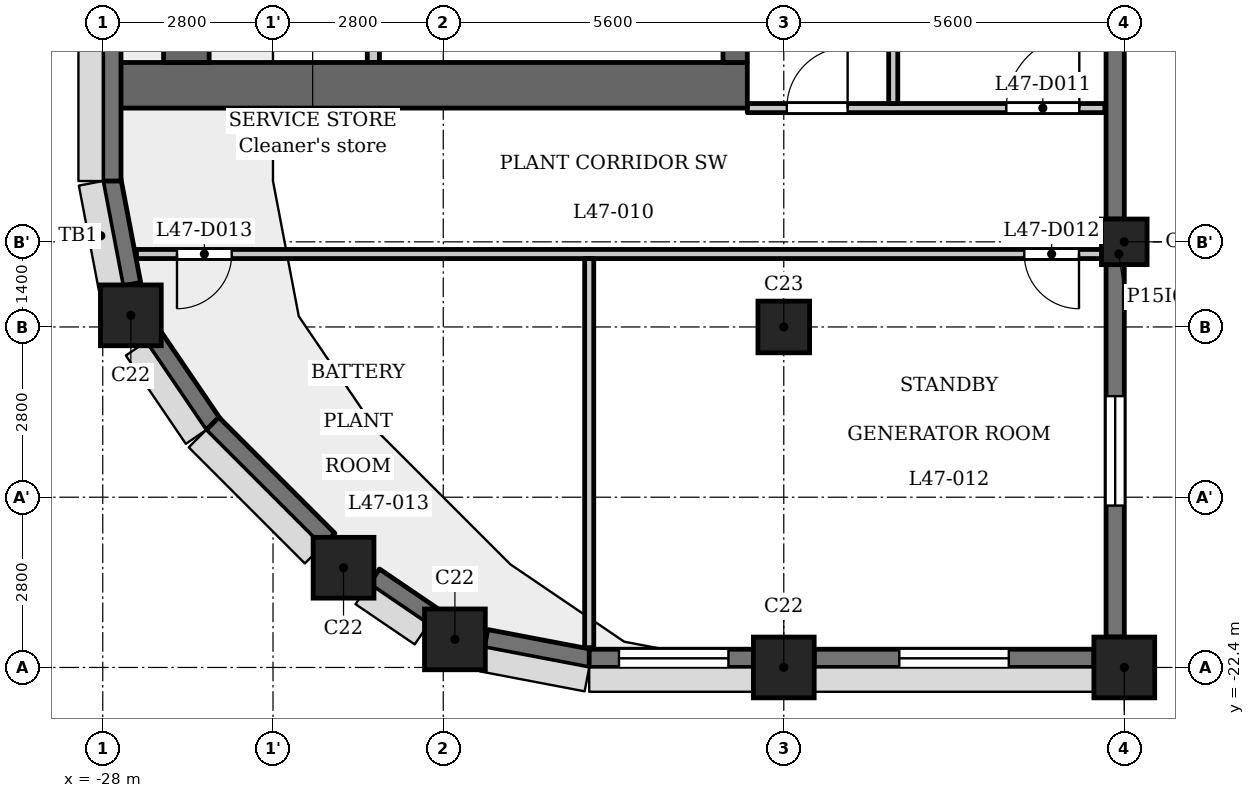
"""IFC4 building model, lengths in metres.
Left out: names, types, materials, properties, quantities, classifications, styles, units other than length and angle.
Written with IfcOpenShell. Run it as: python <this file> out.ifc"""

import sys

from ifc_helpers import new_model, si_unit, direction, frame, frame_2d, origin, origin_2d, place, context, subcontext, project, spatial, rectangle, extrude, element, fill, save


model = new_model("IFC4")
c1 = context("Model", 3, precision=1e-05, world=origin(), true_north=direction((0.0, 1.0)))
c2 = subcontext(c1, "Body", "Model", "MODEL_VIEW")
j1 = project(units=[si_unit("LENGTHUNIT", "METRE"), si_unit("PLANEANGLEUNIT", "RADIAN")], contexts=[c1])
p1 = place(None, origin())
s1 = spatial("IfcSite", under=j1, at=p1, CompositionType="ELEMENT")
p2 = place(p1, origin())
s2 = spatial("IfcBuilding", under=s1, at=p2, CompositionType="ELEMENT")
p3 = place(p2, frame((0.0, 0.0, 183.5)))
s3 = spatial("IfcBuildingStorey", under=s2, at=p3, CompositionType="ELEMENT", Elevation=183.5)
for number, where, z_axis, x_axis in (
    (1, (-22.209, -21.938, 0.0), (0.0, 0.0, 1.0), (1.0, 0.0, 0.0)),
    (2, (-16.8, -22.4, 0.0), (0.0, 0.0, 1.0), (1.0, 0.0, 0.0)),
    (3, (-11.2, -22.4, 0.0), (0.0, 0.0, 1.0), (1.0, 0.0, 0.0)),
    (4, (-27.538, -16.609, 0.0), (0.0, 0.0, 1.0), (1.0, 0.0, 0.0)),
    (5, (-24.04, -20.76, 0.0), (0.0, 0.0, 1.0), (1.0, 0.0, 0.0)),
):
    element("IfcColumn", number, at=place(p3, frame(where, z_axis=z_axis, x_axis=x_axis)), inside=s3, PredefinedType="COLUMN", context=c2, shape_type="SweptSolid", body=[
        extrude(rectangle(XDim=1.0, YDim=1.0, at=origin_2d()), origin(), (0.0, 0.0, 1.0), 5.4),
    ])
p4 = place(p3, frame((-16.8, -16.8, 0.0), z_axis=(0.0, 0.0, 1.0), x_axis=(1.0, 0.0, 0.0)))
e6 = element("IfcColumn", 6, at=p4, inside=s3, PredefinedType="COLUMN", context=c2, shape_type="SweptSolid", body=[
    extrude(rectangle(XDim=0.85, YDim=0.85, at=origin_2d()), origin(), (0.0, 0.0, 1.0), 5.4),
])
p5 = place(p3, frame((-11.2, -15.4, 0.0), z_axis=(0.0, 0.0, 1.0), x_axis=(1.0, 0.0, 0.0)))
e7 = element("IfcColumn", 7, at=p5, inside=s3, PredefinedType="COLUMN", context=c2, shape_type="SweptSolid", body=[
    extrude(rectangle(XDim=0.75, YDim=0.75, at=origin_2d()), origin(), (0.0, 0.0, 1.0), 5.4),
])
for number, where, z_axis, x_axis in (
    (8, (-27.853, -14.372, 0.0), (0.0, 0.0, 1.0), (0.187, -0.982, 0.0)),
    (9, (-27.166, -16.96, 0.0), (0.0, 0.0, 1.0), (0.562, -0.827, 0.0)),
):
    element("IfcWall", number, at=place(p3, frame(where, z_axis=z_axis, x_axis=x_axis)), inside=s3, PredefinedType="SOLIDWALL", context=c2, shape_type="SweptSolid", body=[
        extrude(rectangle(XDim=1.756, YDim=0.3, at=frame_2d((0.878, 0.0))), origin(), (0.0, 0.0, 1.0), 2.6),
    ])
p6 = place(p3, frame((-26.197, -18.391, 0.0), z_axis=(0.0, 0.0, 1.0), x_axis=(0.707061571201, -0.707151988282, 0.0)))
e10 = element("IfcWall", 10, at=p6, inside=s3, PredefinedType="SOLIDWALL", context=c2, shape_type="SweptSolid", body=[
    extrude(rectangle(XDim=2.7, YDim=0.3, at=frame_2d((1.35, 0.0))), origin(), (0.0, 0.0, 1.0), 2.6),
])
p7 = place(p3, frame((-23.534, -20.904, 0.0), z_axis=(0.0, 0.0, 1.0), x_axis=(0.827103906596, -0.56204904385, 0.0)))
e11 = element("IfcWall", 11, at=p7, inside=s3, PredefinedType="SOLIDWALL", context=c2, shape_type="SweptSolid", body=[
    extrude(rectangle(XDim=1.177, YDim=0.3, at=frame_2d((0.589, 0.0))), origin(), (0.0, 0.0, 1.0), 4.6),
])
p8 = place(p3, frame((-21.697, -21.924, 0.0), z_axis=(0.0, 0.0, 1.0), x_axis=(0.982284988433, -0.187393173565, 0.0)))
e12 = element("IfcWall", 12, at=p8, inside=s3, PredefinedType="SOLIDWALL", context=c2, shape_type="SweptSolid", body=[
    extrude(rectangle(XDim=1.756, YDim=0.3, at=frame_2d((0.878, 0.0))), origin(), (0.0, 0.0, 1.0), 2.6),
])
p9 = place(p3, frame((-20.0, -22.25, 0.0), z_axis=(0.0, 0.0, 1.0), x_axis=(1.0, 0.0, 0.0)))
e13 = element("IfcWall", 13, at=p9, inside=s3, PredefinedType="SOLIDWALL", context=c2, shape_type="SweptSolid", body=[
    extrude(rectangle(XDim=2.7, YDim=0.3, at=frame_2d((1.35, 0.0))), origin(), (0.0, 0.0, 1.0), 2.6),
])
p10 = place(p9, frame((0.49, 0.0, 0.9)))
e14 = element("IfcOpeningElement", 14, at=p10, cuts=e13, PredefinedType="OPENING", context=c2, shape_type="SweptSolid", body=[
    extrude(rectangle(XDim=1.8, YDim=1.5, at=frame_2d((0.9, 0.75))), frame((0.0, 0.16, 0.0), z_axis=(0.0, -1.0, 0.0), x_axis=(1.0, 0.0, 0.0)), (0.0, 0.0, 1.0), 0.32),
])
p11 = place(p3, frame((-16.3, -22.25, 0.0), z_axis=(0.0, 0.0, 1.0), x_axis=(1.0, 0.0, 0.0)))
e15 = element("IfcWall", 15, at=p11, inside=s3, PredefinedType="SOLIDWALL", context=c2, shape_type="SweptSolid", body=[
    extrude(rectangle(XDim=4.6, YDim=0.3, at=frame_2d((2.3, 0.0))), origin(), (0.0, 0.0, 1.0), 2.6),
])
p12 = place(p11, frame((1.4, 0.0, 0.9)))
e16 = element("IfcOpeningElement", 16, at=p12, cuts=e15, PredefinedType="OPENING", context=c2, shape_type="SweptSolid", body=[
    extrude(rectangle(XDim=1.8, YDim=1.5, at=frame_2d((0.9, 0.75))), frame((0.0, 0.16, 0.0), z_axis=(0.0, -1.0, 0.0), x_axis=(1.0, 0.0, 0.0)), (0.0, 0.0, 1.0), 0.32),
])
p13 = place(p3, frame((-11.35, -21.9, 0.0), z_axis=(0.0, 0.0, 1.0), x_axis=(0.0, 1.0, 0.0)))
e17 = element("IfcWall", 17, at=p13, inside=s3, PredefinedType="SOLIDWALL", context=c2, shape_type="SweptSolid", body=[
    extrude(rectangle(XDim=6.125, YDim=0.3, at=frame_2d((3.062, 0.0))), origin(), (0.0, 0.0, 1.0), 4.6),
])
p14 = place(p13, frame((2.163, 0.0, 0.9)))
e18 = element("IfcOpeningElement", 18, at=p14, cuts=e17, PredefinedType="OPENING", context=c2, shape_type="SweptSolid", body=[
    extrude(rectangle(XDim=1.8, YDim=1.5, at=frame_2d((0.9, 0.75))), frame((0.0, 0.16, 0.0), z_axis=(0.0, -1.0, 0.0), x_axis=(1.0, 0.0, 0.0)), (0.0, 0.0, 1.0), 0.32),
])
p15 = place(p3, frame((-11.35, -15.025, 0.0), z_axis=(0.0, 0.0, 1.0), x_axis=(0.0, 1.0, 0.0)))
e19 = element("IfcWall", 19, at=p15, inside=s3, PredefinedType="SOLIDWALL", context=c2, shape_type="SweptSolid", body=[
    extrude(rectangle(XDim=6.2, YDim=0.3, at=frame_2d((3.1, 0.0))), origin(), (0.0, 0.0, 1.0), 4.6),
])
p16 = place(p15, frame((3.15, 0.0, 0.9)))
e20 = element("IfcOpeningElement", 20, at=p16, cuts=e19, PredefinedType="OPENING", context=c2, shape_type="SweptSolid", body=[
    extrude(rectangle(XDim=1.8, YDim=1.5, at=frame_2d((0.9, 0.75))), frame((0.0, 0.16, 0.0), z_axis=(0.0, -1.0, 0.0), x_axis=(1.0, 0.0, 0.0)), (0.0, 0.0, 1.0), 0.32),
])
p17 = place(p3, frame((-27.85, -11.7, 0.0), z_axis=(0.0, 0.0, 1.0), x_axis=(0.0, -1.0, 0.0)))
e21 = element("IfcWall", 21, at=p17, inside=s3, PredefinedType="SOLIDWALL", context=c2, shape_type="SweptSolid", body=[
    extrude(rectangle(XDim=2.7, YDim=0.3, at=frame_2d((1.35, 0.0))), origin(), (0.0, 0.0, 1.0), 2.6),
])
p18 = place(p3, frame((-17.4, -12.825, 0.0), z_axis=(0.0, 0.0, 1.0), x_axis=(-1.0, 0.0, 0.0)))
e22 = element("IfcWall", 22, at=p18, inside=s3, PredefinedType="SHEAR", context=c2, shape_type="SweptSolid", body=[
    extrude(rectangle(XDim=10.4, YDim=0.75, at=frame_2d((5.2, 0.0))), origin(), (0.0, 0.0, 1.0), 4.6),
])
p19 = place(p3, frame((-17.6, -12.45, 0.0), z_axis=(0.0, 0.0, 1.0), x_axis=(0.0, 1.0, 0.0)))
e23 = element("IfcWall", 23, at=p19, inside=s3, PredefinedType="SHEAR", context=c2, shape_type="SweptSolid", body=[
    extrude(rectangle(XDim=24.9, YDim=0.4, at=frame_2d((12.45, 0.0))), origin(), (0.0, 0.0, 1.0), 4.6),
])
p20 = place(p19, frame((8.65, 0.0, 0.0)))
e24 = element("IfcOpeningElement", 24, at=p20, cuts=e23, PredefinedType="OPENING", context=c2, shape_type="SweptSolid", body=[
    extrude(rectangle(XDim=0.9, YDim=2.1, at=frame_2d((0.45, 1.05))), frame((0.0, 0.21, 0.0), z_axis=(0.0, -1.0, 0.0), x_axis=(1.0, 0.0, 0.0)), (0.0, 0.0, 1.0), 0.42),
])
p21 = place(p19, frame((15.6, 0.0, 0.0)))
e25 = element("IfcOpeningElement", 25, at=p21, cuts=e23, PredefinedType="OPENING", context=c2, shape_type="SweptSolid", body=[
    extrude(rectangle(XDim=1.1, YDim=2.1, at=frame_2d((0.55, 1.05))), frame((0.0, 0.21, 0.0), z_axis=(0.0, -1.0, 0.0), x_axis=(1.0, 0.0, 0.0)), (0.0, 0.0, 1.0), 0.42),
])
p22 = place(p19, frame((18.0, 0.0, 0.0)))
e26 = element("IfcOpeningElement", 26, at=p22, cuts=e23, PredefinedType="OPENING", context=c2, shape_type="SweptSolid", body=[
    extrude(rectangle(XDim=1.1, YDim=2.1, at=frame_2d((0.55, 1.05))), frame((0.0, 0.21, 0.0), z_axis=(0.0, -1.0, 0.0), x_axis=(1.0, 0.0, 0.0)), (0.0, 0.0, 1.0), 0.42),
])
p23 = place(p19, frame((23.025, 0.0, 0.0)))
e27 = element("IfcOpeningElement", 27, at=p23, cuts=e23, PredefinedType="OPENING", context=c2, shape_type="SweptSolid", body=[
    extrude(rectangle(XDim=1.1, YDim=2.1, at=frame_2d((0.55, 1.05))), frame((0.0, 0.21, 0.0), z_axis=(0.0, -1.0, 0.0), x_axis=(1.0, 0.0, 0.0)), (0.0, 0.0, 1.0), 0.42),
])
p24 = place(p19, frame((0.775, 0.0, 0.0)))
e28 = element("IfcOpeningElement", 28, at=p24, cuts=e23, PredefinedType="OPENING", context=c2, shape_type="SweptSolid", body=[
    extrude(rectangle(XDim=1.1, YDim=2.1, at=frame_2d((0.55, 1.05))), frame((0.0, 0.21, 0.0), z_axis=(0.0, -1.0, 0.0), x_axis=(1.0, 0.0, 0.0)), (0.0, 0.0, 1.0), 0.42),
])
p25 = place(p19, frame((12.925, 0.0, 0.0)))
e29 = element("IfcOpeningElement", 29, at=p25, cuts=e23, PredefinedType="OPENING", context=c2, shape_type="SweptSolid", body=[
    extrude(rectangle(XDim=1.8, YDim=2.1, at=frame_2d((0.9, 1.05))), frame((0.0, 0.21, 0.0), z_axis=(0.0, -1.0, 0.0), x_axis=(1.0, 0.0, 0.0)), (0.0, 0.0, 1.0), 0.42),
])
p26 = place(p3, frame((-26.625, -12.45, 0.0), z_axis=(0.0, 0.0, 1.0), x_axis=(0.0, 1.0, 0.0)))
e30 = element("IfcWall", 30, at=p26, inside=s3, PredefinedType="SHEAR", context=c2, shape_type="SweptSolid", body=[
    extrude(rectangle(XDim=24.9, YDim=0.75, at=frame_2d((12.45, 0.0))), origin(), (0.0, 0.0, 1.0), 4.6),
])
p27 = place(p3, frame((-23.55, -12.45, 0.0), z_axis=(0.0, 0.0, 1.0), x_axis=(0.0, 1.0, 0.0)))
e31 = element("IfcWall", 31, at=p27, inside=s3, PredefinedType="PARTITIONING", context=c2, shape_type="SweptSolid", body=[
    extrude(rectangle(XDim=2.65, YDim=0.2, at=frame_2d((1.325, 0.0))), origin(), (0.0, 0.0, 1.0), 4.6),
])
p28 = place(p27, frame((0.875, 0.0, 0.0)))
e32 = element("IfcOpeningElement", 32, at=p28, cuts=e31, PredefinedType="OPENING", context=c2, shape_type="SweptSolid", body=[
    extrude(rectangle(XDim=0.9, YDim=2.1, at=frame_2d((0.45, 1.05))), frame((0.0, 0.11, 0.0), z_axis=(0.0, -1.0, 0.0), x_axis=(1.0, 0.0, 0.0)), (0.0, 0.0, 1.0), 0.22),
])
p29 = place(p3, frame((-27.446, -15.6, 0.0), z_axis=(0.0, 0.0, 1.0), x_axis=(1.0, 0.0, 0.0)))
e33 = element("IfcWall", 33, at=p29, inside=s3, PredefinedType="PARTITIONING", context=c2, shape_type="SweptSolid", body=[
    extrude(rectangle(XDim=16.156, YDim=0.15, at=frame_2d((8.078, 0.0))), origin(), (0.0, 0.0, 1.0), 4.6),
])
p30 = place(p29, frame((14.601, 0.0, 0.0)))
e34 = element("IfcOpeningElement", 34, at=p30, cuts=e33, PredefinedType="OPENING", context=c2, shape_type="SweptSolid", body=[
    extrude(rectangle(XDim=0.9, YDim=2.1, at=frame_2d((0.45, 1.05))), frame((0.0, 0.085, 0.0), z_axis=(0.0, -1.0, 0.0), x_axis=(1.0, 0.0, 0.0)), (0.0, 0.0, 1.0), 0.17),
])
p31 = place(p29, frame((0.667, 0.0, 0.0)))
e35 = element("IfcOpeningElement", 35, at=p31, cuts=e33, PredefinedType="OPENING", context=c2, shape_type="SweptSolid", body=[
    extrude(rectangle(XDim=0.9, YDim=2.1, at=frame_2d((0.45, 1.05))), frame((0.0, 0.085, 0.0), z_axis=(0.0, -1.0, 0.0), x_axis=(1.0, 0.0, 0.0)), (0.0, 0.0, 1.0), 0.17),
])
p32 = place(p3, frame((-17.4, -13.2, 0.0), z_axis=(0.0, 0.0, 1.0), x_axis=(1.0, 0.0, 0.0)))
e36 = element("IfcWall", 36, at=p32, inside=s3, PredefinedType="PARTITIONING", context=c2, shape_type="SweptSolid", body=[
    extrude(rectangle(XDim=5.88, YDim=0.15, at=frame_2d((2.94, 0.0))), origin(), (0.0, 0.0, 1.0), 4.6),
])
p33 = place(p32, frame((0.65, 0.0, 0.0)))
e37 = element("IfcOpeningElement", 37, at=p33, cuts=e36, PredefinedType="OPENING", context=c2, shape_type="SweptSolid", body=[
    extrude(rectangle(XDim=1.0, YDim=2.1, at=frame_2d((0.5, 1.05))), frame((0.0, 0.085, 0.0), z_axis=(0.0, -1.0, 0.0), x_axis=(1.0, 0.0, 0.0)), (0.0, 0.0, 1.0), 0.17),
])
p34 = place(p32, frame((4.26, 0.0, 0.0)))
e38 = element("IfcOpeningElement", 38, at=p34, cuts=e36, PredefinedType="OPENING", context=c2, shape_type="SweptSolid", body=[
    extrude(rectangle(XDim=1.2, YDim=2.1, at=frame_2d((0.6, 1.05))), frame((0.0, 0.085, 0.0), z_axis=(0.0, -1.0, 0.0), x_axis=(1.0, 0.0, 0.0)), (0.0, 0.0, 1.0), 0.17),
])
p35 = place(p3, frame((-20.0, -22.075, 0.0), z_axis=(0.0, 0.0, 1.0), x_axis=(0.0, 1.0, 0.0)))
e39 = element("IfcWall", 39, at=p35, inside=s3, PredefinedType="PARTITIONING", context=c2, shape_type="SweptSolid", body=[
    extrude(rectangle(XDim=6.4, YDim=0.15, at=frame_2d((3.2, 0.0))), origin(), (0.0, 0.0, 1.0), 4.6),
])
p36 = place(p3, frame((-15.0, -13.125, 0.0), z_axis=(0.0, 0.0, 1.0), x_axis=(0.0, 1.0, 0.0)))
e40 = element("IfcWall", 40, at=p36, inside=s3, PredefinedType="PARTITIONING", context=c2, shape_type="SweptSolid", body=[
    extrude(rectangle(XDim=6.356, YDim=0.15, at=frame_2d((3.178, 0.0))), origin(), (0.0, 0.0, 1.0), 4.6),
])
p37 = place(p33, origin())
e41 = element("IfcDoor", 41, at=p37, inside=s3, OperationType="SINGLE_SWING_LEFT", PredefinedType="DOOR", context=c2, shape_type="SweptSolid", body=[
    extrude(rectangle(XDim=1.0, YDim=2.1, at=frame_2d((0.5, 1.05))), frame((0.0, 0.025, 0.0), z_axis=(0.0, -1.0, 0.0), x_axis=(1.0, 0.0, 0.0)), (0.0, 0.0, 1.0), 0.05),
])
fill(e37, e41)
p38 = place(p34, origin())
e42 = element("IfcDoor", 42, at=p38, inside=s3, OperationType="SINGLE_SWING_LEFT", PredefinedType="DOOR", context=c2, shape_type="SweptSolid", body=[
    extrude(rectangle(XDim=1.2, YDim=2.1, at=frame_2d((0.6, 1.05))), frame((0.0, 0.025, 0.0), z_axis=(0.0, -1.0, 0.0), x_axis=(1.0, 0.0, 0.0)), (0.0, 0.0, 1.0), 0.05),
])
fill(e38, e42)
p39 = place(p30, origin())
e43 = element("IfcDoor", 43, at=p39, inside=s3, OperationType="SINGLE_SWING_RIGHT", PredefinedType="DOOR", context=c2, shape_type="SweptSolid", body=[
    extrude(rectangle(XDim=0.9, YDim=2.1, at=frame_2d((0.45, 1.05))), frame((0.0, 0.025, 0.0), z_axis=(0.0, -1.0, 0.0), x_axis=(1.0, 0.0, 0.0)), (0.0, 0.0, 1.0), 0.05),
])
fill(e34, e43)
p40 = place(p31, origin())
e44 = element("IfcDoor", 44, at=p40, inside=s3, OperationType="SINGLE_SWING_LEFT", PredefinedType="DOOR", context=c2, shape_type="SweptSolid", body=[
    extrude(rectangle(XDim=0.9, YDim=2.1, at=frame_2d((0.45, 1.05))), frame((0.0, 0.025, 0.0), z_axis=(0.0, -1.0, 0.0), x_axis=(1.0, 0.0, 0.0)), (0.0, 0.0, 1.0), 0.05),
])
fill(e35, e44)
p41 = place(p10, origin())
e45 = element("IfcWindow", 45, at=p41, inside=s3, PartitioningType="SINGLE_PANEL", PredefinedType="WINDOW", context=c2, shape_type="SweptSolid", body=[
    extrude(rectangle(XDim=1.8, YDim=1.5, at=frame_2d((0.9, 0.75))), frame((0.0, 0.03, 0.0), z_axis=(0.0, -1.0, 0.0), x_axis=(1.0, 0.0, 0.0)), (0.0, 0.0, 1.0), 0.06),
])
fill(e14, e45)
p42 = place(p12, origin())
e46 = element("IfcWindow", 46, at=p42, inside=s3, PartitioningType="SINGLE_PANEL", PredefinedType="WINDOW", context=c2, shape_type="SweptSolid", body=[
    extrude(rectangle(XDim=1.8, YDim=1.5, at=frame_2d((0.9, 0.75))), frame((0.0, 0.03, 0.0), z_axis=(0.0, -1.0, 0.0), x_axis=(1.0, 0.0, 0.0)), (0.0, 0.0, 1.0), 0.06),
])
fill(e16, e46)
p43 = place(p14, origin())
e47 = element("IfcWindow", 47, at=p43, inside=s3, PartitioningType="SINGLE_PANEL", PredefinedType="WINDOW", context=c2, shape_type="SweptSolid", body=[
    extrude(rectangle(XDim=1.8, YDim=1.5, at=frame_2d((0.9, 0.75))), frame((0.0, 0.03, 0.0), z_axis=(0.0, -1.0, 0.0), x_axis=(1.0, 0.0, 0.0)), (0.0, 0.0, 1.0), 0.06),
])
fill(e18, e47)
save(model, sys.argv[1])
